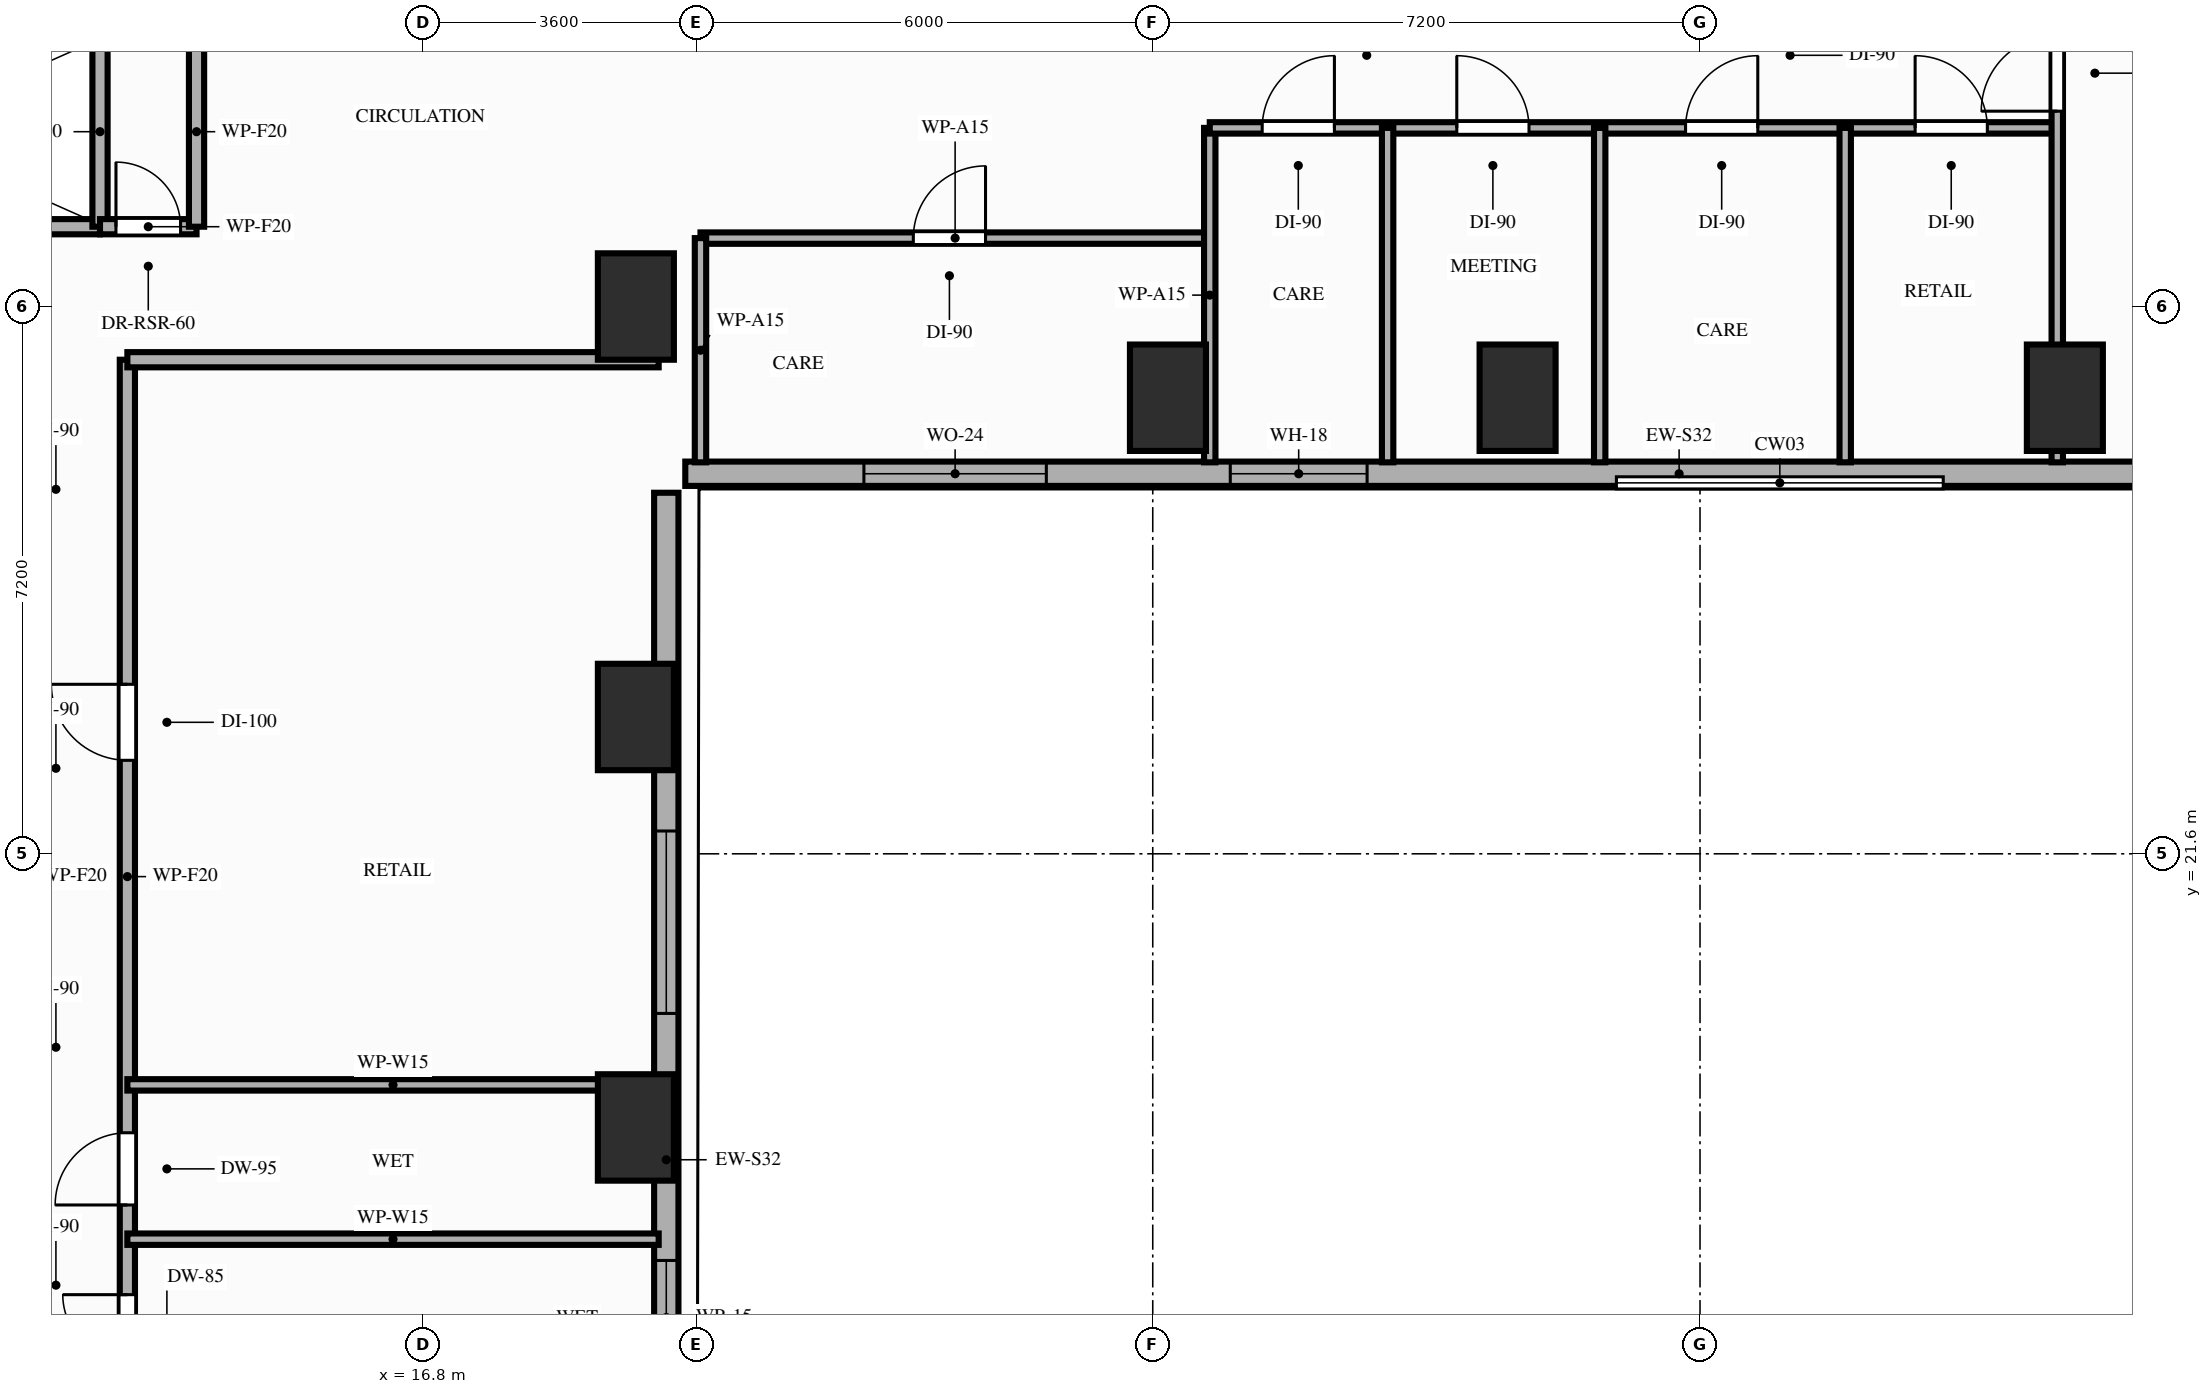
"""IFC4 building model, lengths in metres.
Left out: names, types, materials, properties, quantities, classifications, styles, units other than length and angle.
Written with IfcOpenShell. Run it as: python <this file> out.ifc"""

import sys

from ifc_helpers import new_model, si_unit, direction, frame, frame_2d, origin, origin_2d, place, context, subcontext, project, spatial, rectangle, extrude, element, fill, save


model = new_model("IFC4")
c1 = context("Model", 3, precision=1e-05, world=origin(), true_north=direction((0.0, 1.0)))
c2 = subcontext(c1, "Body", "Model", "MODEL_VIEW")
j1 = project(units=[si_unit("LENGTHUNIT", "METRE"), si_unit("PLANEANGLEUNIT", "RADIAN")], contexts=[c1])
p1 = place(None, origin())
s1 = spatial("IfcSite", under=j1, at=p1, CompositionType="ELEMENT")
p2 = place(p1, origin())
s2 = spatial("IfcBuilding", under=s1, at=p2, CompositionType="ELEMENT")
p3 = place(p2, frame((0.0, 0.0, 53.2)))
s3 = spatial("IfcBuildingStorey", under=s2, at=p3, CompositionType="ELEMENT", Elevation=53.2)
for number, where, z_axis, x_axis in (
    (1, (19.6, 18.0, 0.0), (0.0, 0.0, 1.0), (1.0, 0.0, 0.0)),
    (2, (19.6, 23.4, 0.0), (0.0, 0.0, 1.0), (1.0, 0.0, 0.0)),
    (3, (19.6, 28.8, 0.0), (0.0, 0.0, 1.0), (1.0, 0.0, 0.0)),
    (4, (26.6, 27.6, 0.0), (0.0, 0.0, 1.0), (1.0, 0.0, 0.0)),
    (5, (31.2, 27.6, 0.0), (0.0, 0.0, 1.0), (1.0, 0.0, 0.0)),
    (6, (38.4, 27.6, 0.0), (0.0, 0.0, 1.0), (1.0, 0.0, 0.0)),
):
    element("IfcColumn", number, at=place(p3, frame(where, z_axis=z_axis, x_axis=x_axis)), inside=s3, PredefinedType="COLUMN", context=c2, shape_type="SweptSolid", body=[
        extrude(rectangle(XDim=1.0, YDim=1.4, at=origin_2d()), origin(), (0.0, 0.0, 1.0), 3.2),
    ])
p4 = place(p3, frame((20.0, 8.8, 0.0), z_axis=(0.0, 0.0, 1.0), x_axis=(0.0, 1.0, 0.0)))
e7 = element("IfcWall", 7, at=p4, inside=s3, PredefinedType="STANDARD", context=c2, shape_type="SweptSolid", body=[
    extrude(rectangle(XDim=17.55, YDim=0.32, at=frame_2d((8.775, 0.0))), origin(), (0.0, 0.0, 1.0), 2.41),
])
p5 = place(p4, frame((5.95, 0.0, 0.85)))
e8 = element("IfcOpeningElement", 8, at=p5, cuts=e7, PredefinedType="OPENING", context=c2, shape_type="SweptSolid", body=[
    extrude(rectangle(XDim=1.5, YDim=1.31, at=frame_2d((0.75, 0.655))), frame((0.0, 0.17, 0.0), z_axis=(0.0, -1.0, 0.0), x_axis=(1.0, 0.0, 0.0)), (0.0, 0.0, 1.0), 0.34),
])
p6 = place(p4, frame((10.7, 0.0, 0.85)))
e9 = element("IfcOpeningElement", 9, at=p6, cuts=e7, PredefinedType="OPENING", context=c2, shape_type="SweptSolid", body=[
    extrude(rectangle(XDim=2.4, YDim=1.31, at=frame_2d((1.2, 0.655))), frame((0.0, 0.17, 0.0), z_axis=(0.0, -1.0, 0.0), x_axis=(1.0, 0.0, 0.0)), (0.0, 0.0, 1.0), 0.34),
])
p7 = place(p3, frame((20.25, 26.6, 0.0), z_axis=(0.0, 0.0, 1.0), x_axis=(1.0, 0.0, 0.0)))
e10 = element("IfcWall", 10, at=p7, inside=s3, PredefinedType="STANDARD", context=c2, shape_type="SweptSolid", body=[
    extrude(rectangle(XDim=26.15, YDim=0.32, at=frame_2d((13.075, 0.0))), origin(), (0.0, 0.0, 1.0), 2.71),
])
p8 = place(p7, frame((2.35, 0.0, 0.85)))
e11 = element("IfcOpeningElement", 11, at=p8, cuts=e10, PredefinedType="OPENING", context=c2, shape_type="SweptSolid", body=[
    extrude(rectangle(XDim=2.4, YDim=1.61, at=frame_2d((1.2, 0.805))), frame((0.0, 0.17, 0.0), z_axis=(0.0, -1.0, 0.0), x_axis=(1.0, 0.0, 0.0)), (0.0, 0.0, 1.0), 0.34),
])
p9 = place(p7, frame((7.17, 0.0, 0.85)))
e12 = element("IfcOpeningElement", 12, at=p9, cuts=e10, PredefinedType="OPENING", context=c2, shape_type="SweptSolid", body=[
    extrude(rectangle(XDim=1.8, YDim=1.61, at=frame_2d((0.9, 0.805))), frame((0.0, 0.17, 0.0), z_axis=(0.0, -1.0, 0.0), x_axis=(1.0, 0.0, 0.0)), (0.0, 0.0, 1.0), 0.34),
])
p10 = place(p7, frame((21.95, 0.0, 0.85)))
e13 = element("IfcOpeningElement", 13, at=p10, cuts=e10, PredefinedType="OPENING", context=c2, shape_type="SweptSolid", body=[
    extrude(rectangle(XDim=2.4, YDim=1.61, at=frame_2d((1.2, 0.805))), frame((0.0, 0.17, 0.0), z_axis=(0.0, -1.0, 0.0), x_axis=(1.0, 0.0, 0.0)), (0.0, 0.0, 1.0), 0.34),
])
p11 = place(p3, frame((7.0, 29.85, 0.0), z_axis=(0.0, 0.0, 1.0), x_axis=(1.0, 0.0, 0.0)))
e14 = element("IfcWall", 14, at=p11, inside=s3, PredefinedType="MOVABLE", context=c2, shape_type="SweptSolid", body=[
    extrude(rectangle(XDim=5.55, YDim=0.2, at=frame_2d((2.775, 0.0))), origin(), (0.0, 0.0, 1.0), 3.02),
])
p12 = place(p3, frame((12.55, 29.85, 0.0), z_axis=(0.0, 0.0, 1.0), x_axis=(0.0, 1.0, 0.0)))
e15 = element("IfcWall", 15, at=p12, inside=s3, PredefinedType="MOVABLE", context=c2, shape_type="SweptSolid", body=[
    extrude(rectangle(XDim=2.5, YDim=0.2, at=frame_2d((1.25, 0.0))), origin(), (0.0, 0.0, 1.0), 3.02),
])
p13 = place(p3, frame((12.55, 29.85, 0.0), z_axis=(0.0, 0.0, 1.0), x_axis=(1.0, 0.0, 0.0)))
e16 = element("IfcWall", 16, at=p13, inside=s3, PredefinedType="PARTITIONING", context=c2, shape_type="SweptSolid", body=[
    extrude(rectangle(XDim=1.27, YDim=0.2, at=frame_2d((0.635, 0.0))), origin(), (0.0, 0.0, 1.0), 3.02),
])
p14 = place(p13, frame((0.21, 0.0, 0.0)))
e17 = element("IfcOpeningElement", 17, at=p14, cuts=e16, PredefinedType="OPENING", context=c2, shape_type="SweptSolid", body=[
    extrude(rectangle(XDim=0.85, YDim=2.05, at=frame_2d((0.425, 1.025))), frame((0.0, 0.11, 0.0), z_axis=(0.0, -1.0, 0.0), x_axis=(1.0, 0.0, 0.0)), (0.0, 0.0, 1.0), 0.22),
])
p15 = place(p3, frame((13.82, 29.85, 0.0), z_axis=(0.0, 0.0, 1.0), x_axis=(0.0, 1.0, 0.0)))
e18 = element("IfcWall", 18, at=p15, inside=s3, PredefinedType="PARTITIONING", context=c2, shape_type="SweptSolid", body=[
    extrude(rectangle(XDim=2.5, YDim=0.2, at=frame_2d((1.25, 0.0))), origin(), (0.0, 0.0, 1.0), 3.02),
])
p16 = place(p3, frame((12.91, 14.5, 0.0), z_axis=(0.0, 0.0, 1.0), x_axis=(0.0, 1.0, 0.0)))
e19 = element("IfcWall", 19, at=p16, inside=s3, PredefinedType="PARTITIONING", context=c2, shape_type="SweptSolid", body=[
    extrude(rectangle(XDim=13.6, YDim=0.2, at=frame_2d((6.8, 0.0))), origin(), (0.0, 0.0, 1.0), 2.41),
])
p17 = place(p16, frame((0.45, 0.0, 0.0)))
e20 = element("IfcOpeningElement", 20, at=p17, cuts=e19, PredefinedType="OPENING", context=c2, shape_type="SweptSolid", body=[
    extrude(rectangle(XDim=0.85, YDim=2.1, at=frame_2d((0.425, 1.05))), frame((0.0, 0.11, 0.0), z_axis=(0.0, -1.0, 0.0), x_axis=(1.0, 0.0, 0.0)), (0.0, 0.0, 1.0), 0.22),
])
p18 = place(p16, frame((2.48, 0.0, 0.0)))
e21 = element("IfcOpeningElement", 21, at=p18, cuts=e19, PredefinedType="OPENING", context=c2, shape_type="SweptSolid", body=[
    extrude(rectangle(XDim=0.95, YDim=2.1, at=frame_2d((0.475, 1.05))), frame((0.0, 0.11, 0.0), z_axis=(0.0, -1.0, 0.0), x_axis=(1.0, 0.0, 0.0)), (0.0, 0.0, 1.0), 0.22),
])
p19 = place(p16, frame((8.33, 0.0, 0.0)))
e22 = element("IfcOpeningElement", 22, at=p19, cuts=e19, PredefinedType="OPENING", context=c2, shape_type="SweptSolid", body=[
    extrude(rectangle(XDim=1.0, YDim=2.15, at=frame_2d((0.5, 1.075))), frame((0.0, 0.11, 0.0), z_axis=(0.0, -1.0, 0.0), x_axis=(1.0, 0.0, 0.0)), (0.0, 0.0, 1.0), 0.22),
])
p20 = place(p3, frame((12.91, 28.1, 0.0), z_axis=(0.0, 0.0, 1.0), x_axis=(1.0, 0.0, 0.0)))
e23 = element("IfcWall", 23, at=p20, inside=s3, PredefinedType="PARTITIONING", context=c2, shape_type="SweptSolid", body=[
    extrude(rectangle(XDim=6.99, YDim=0.2, at=frame_2d((3.495, 0.0))), origin(), (0.0, 0.0, 1.0), 2.41),
])
p21 = place(p3, frame((20.45, 29.7, 0.0), z_axis=(0.0, 0.0, 1.0), x_axis=(1.0, 0.0, 0.0)))
e24 = element("IfcWall", 24, at=p21, inside=s3, PredefinedType="PARTITIONING", context=c2, shape_type="SweptSolid", body=[
    extrude(rectangle(XDim=6.7, YDim=0.15, at=frame_2d((3.35, 0.0))), origin(), (0.0, 0.0, 1.0), 3.02),
])
p22 = place(p21, frame((2.8, 0.0, 0.0)))
e25 = element("IfcOpeningElement", 25, at=p22, cuts=e24, PredefinedType="OPENING", context=c2, shape_type="SweptSolid", body=[
    extrude(rectangle(XDim=0.95, YDim=2.15, at=frame_2d((0.475, 1.075))), frame((0.0, 0.085, 0.0), z_axis=(0.0, -1.0, 0.0), x_axis=(1.0, 0.0, 0.0)), (0.0, 0.0, 1.0), 0.17),
])
p23 = place(p3, frame((20.45, 26.75, 0.0), z_axis=(0.0, 0.0, 1.0), x_axis=(0.0, 1.0, 0.0)))
e26 = element("IfcWall", 26, at=p23, inside=s3, PredefinedType="PARTITIONING", context=c2, shape_type="SweptSolid", body=[
    extrude(rectangle(XDim=2.95, YDim=0.15, at=frame_2d((1.475, 0.0))), origin(), (0.0, 0.0, 1.0), 2.41),
])
p24 = place(p3, frame((27.15, 26.75, 0.0), z_axis=(0.0, 0.0, 1.0), x_axis=(0.0, 1.0, 0.0)))
e27 = element("IfcWall", 27, at=p24, inside=s3, PredefinedType="PARTITIONING", context=c2, shape_type="SweptSolid", body=[
    extrude(rectangle(XDim=4.4, YDim=0.15, at=frame_2d((2.2, 0.0))), origin(), (0.0, 0.0, 1.0), 2.41),
])
for number, where, z_axis, x_axis in (
    (28, (12.91, 16.53, 0.0), (0.0, 0.0, 1.0), (1.0, 0.0, 0.0)),
    (29, (12.91, 18.56, 0.0), (0.0, 0.0, 1.0), (1.0, 0.0, 0.0)),
):
    element("IfcWall", number, at=place(p3, frame(where, z_axis=z_axis, x_axis=x_axis)), inside=s3, PredefinedType="PARTITIONING", context=c2, shape_type="SweptSolid", body=[
        extrude(rectangle(XDim=6.99, YDim=0.15, at=frame_2d((3.495, 0.0))), origin(), (0.0, 0.0, 1.0), 2.41),
    ])
p25 = place(p3, frame((27.15, 31.15, 0.0), z_axis=(0.0, 0.0, 1.0), x_axis=(1.0, 0.0, 0.0)))
e30 = element("IfcWall", 30, at=p25, inside=s3, PredefinedType="PARTITIONING", context=c2, shape_type="SweptSolid", body=[
    extrude(rectangle(XDim=11.15, YDim=0.15, at=frame_2d((5.575, 0.0))), origin(), (0.0, 0.0, 1.0), 2.41),
])
p26 = place(p25, frame((0.69, 0.0, 0.0)))
e31 = element("IfcOpeningElement", 31, at=p26, cuts=e30, PredefinedType="OPENING", context=c2, shape_type="SweptSolid", body=[
    extrude(rectangle(XDim=0.95, YDim=2.15, at=frame_2d((0.475, 1.075))), frame((0.0, 0.085, 0.0), z_axis=(0.0, -1.0, 0.0), x_axis=(1.0, 0.0, 0.0)), (0.0, 0.0, 1.0), 0.17),
])
p27 = place(p25, frame((3.25, 0.0, 0.0)))
e32 = element("IfcOpeningElement", 32, at=p27, cuts=e30, PredefinedType="OPENING", context=c2, shape_type="SweptSolid", body=[
    extrude(rectangle(XDim=0.95, YDim=2.15, at=frame_2d((0.475, 1.075))), frame((0.0, 0.085, 0.0), z_axis=(0.0, -1.0, 0.0), x_axis=(1.0, 0.0, 0.0)), (0.0, 0.0, 1.0), 0.17),
])
p28 = place(p25, frame((6.26, 0.0, 0.0)))
e33 = element("IfcOpeningElement", 33, at=p28, cuts=e30, PredefinedType="OPENING", context=c2, shape_type="SweptSolid", body=[
    extrude(rectangle(XDim=0.95, YDim=2.15, at=frame_2d((0.475, 1.075))), frame((0.0, 0.085, 0.0), z_axis=(0.0, -1.0, 0.0), x_axis=(1.0, 0.0, 0.0)), (0.0, 0.0, 1.0), 0.17),
])
p29 = place(p25, frame((9.28, 0.0, 0.0)))
e34 = element("IfcOpeningElement", 34, at=p29, cuts=e30, PredefinedType="OPENING", context=c2, shape_type="SweptSolid", body=[
    extrude(rectangle(XDim=0.95, YDim=2.15, at=frame_2d((0.475, 1.075))), frame((0.0, 0.085, 0.0), z_axis=(0.0, -1.0, 0.0), x_axis=(1.0, 0.0, 0.0)), (0.0, 0.0, 1.0), 0.17),
])
p30 = place(p3, frame((38.3, 26.75, 0.0), z_axis=(0.0, 0.0, 1.0), x_axis=(0.0, 1.0, 0.0)))
e35 = element("IfcWall", 35, at=p30, inside=s3, PredefinedType="PARTITIONING", context=c2, shape_type="SweptSolid", body=[
    extrude(rectangle(XDim=15.45, YDim=0.15, at=frame_2d((7.725, 0.0))), origin(), (0.0, 0.0, 1.0), 2.41),
])
p31 = place(p30, frame((4.62, 0.0, 0.0)))
e36 = element("IfcOpeningElement", 36, at=p31, cuts=e35, PredefinedType="OPENING", context=c2, shape_type="SweptSolid", body=[
    extrude(rectangle(XDim=1.0, YDim=2.15, at=frame_2d((0.5, 1.075))), frame((0.0, 0.085, 0.0), z_axis=(0.0, -1.0, 0.0), x_axis=(1.0, 0.0, 0.0)), (0.0, 0.0, 1.0), 0.17),
])
for number, where, z_axis, x_axis in (
    (37, (29.49, 26.75, 0.0), (0.0, 0.0, 1.0), (0.0, 1.0, 0.0)),
    (38, (32.28, 26.75, 0.0), (0.0, 0.0, 1.0), (0.0, 1.0, 0.0)),
    (39, (35.51, 26.75, 0.0), (0.0, 0.0, 1.0), (0.0, 1.0, 0.0)),
):
    element("IfcWall", number, at=place(p3, frame(where, z_axis=z_axis, x_axis=x_axis)), inside=s3, PredefinedType="PARTITIONING", context=c2, shape_type="SweptSolid", body=[
        extrude(rectangle(XDim=4.4, YDim=0.15, at=frame_2d((2.2, 0.0))), origin(), (0.0, 0.0, 1.0), 2.41),
    ])
p32 = place(p8, origin())
e40 = element("IfcWindow", 40, at=p32, inside=s3, PartitioningType="SINGLE_PANEL", PredefinedType="WINDOW", context=c2, shape_type="SweptSolid", body=[
    extrude(rectangle(XDim=2.4, YDim=1.61, at=frame_2d((1.2, 0.805))), frame((0.0, 0.03, 0.0), z_axis=(0.0, -1.0, 0.0), x_axis=(1.0, 0.0, 0.0)), (0.0, 0.0, 1.0), 0.06),
])
fill(e11, e40)
p33 = place(p9, origin())
e41 = element("IfcWindow", 41, at=p33, inside=s3, PartitioningType="SINGLE_PANEL", PredefinedType="WINDOW", context=c2, shape_type="SweptSolid", body=[
    extrude(rectangle(XDim=1.8, YDim=1.61, at=frame_2d((0.9, 0.805))), frame((0.0, 0.03, 0.0), z_axis=(0.0, -1.0, 0.0), x_axis=(1.0, 0.0, 0.0)), (0.0, 0.0, 1.0), 0.06),
])
fill(e12, e41)
p34 = place(p5, origin())
e42 = element("IfcWindow", 42, at=p34, inside=s3, PartitioningType="SINGLE_PANEL", PredefinedType="WINDOW", context=c2, shape_type="SweptSolid", body=[
    extrude(rectangle(XDim=1.5, YDim=1.31, at=frame_2d((0.75, 0.655))), frame((0.0, 0.03, 0.0), z_axis=(0.0, -1.0, 0.0), x_axis=(1.0, 0.0, 0.0)), (0.0, 0.0, 1.0), 0.06),
])
fill(e8, e42)
p35 = place(p6, origin())
e43 = element("IfcWindow", 43, at=p35, inside=s3, PartitioningType="SINGLE_PANEL", PredefinedType="WINDOW", context=c2, shape_type="SweptSolid", body=[
    extrude(rectangle(XDim=2.4, YDim=1.31, at=frame_2d((1.2, 0.655))), frame((0.0, 0.03, 0.0), z_axis=(0.0, -1.0, 0.0), x_axis=(1.0, 0.0, 0.0)), (0.0, 0.0, 1.0), 0.06),
])
fill(e9, e43)
p36 = place(p14, origin())
e44 = element("IfcDoor", 44, at=p36, inside=s3, OperationType="SINGLE_SWING_LEFT", PredefinedType="DOOR", context=c2, shape_type="SweptSolid", body=[
    extrude(rectangle(XDim=0.85, YDim=2.05, at=frame_2d((0.425, 1.025))), frame((0.0, 0.025, 0.0), z_axis=(0.0, -1.0, 0.0), x_axis=(1.0, 0.0, 0.0)), (0.0, 0.0, 1.0), 0.05),
])
fill(e17, e44)
p37 = place(p22, origin())
e45 = element("IfcDoor", 45, at=p37, inside=s3, OperationType="SINGLE_SWING_RIGHT", PredefinedType="DOOR", context=c2, shape_type="SweptSolid", body=[
    extrude(rectangle(XDim=0.95, YDim=2.15, at=frame_2d((0.475, 1.075))), frame((0.0, 0.025, 0.0), z_axis=(0.0, -1.0, 0.0), x_axis=(1.0, 0.0, 0.0)), (0.0, 0.0, 1.0), 0.05),
])
fill(e25, e45)
p38 = place(p17, origin())
e46 = element("IfcDoor", 46, at=p38, inside=s3, OperationType="SINGLE_SWING_RIGHT", PredefinedType="DOOR", context=c2, shape_type="SweptSolid", body=[
    extrude(rectangle(XDim=0.85, YDim=2.1, at=frame_2d((0.425, 1.05))), frame((0.0, 0.025, 0.0), z_axis=(0.0, -1.0, 0.0), x_axis=(1.0, 0.0, 0.0)), (0.0, 0.0, 1.0), 0.05),
])
fill(e20, e46)
p39 = place(p18, origin())
e47 = element("IfcDoor", 47, at=p39, inside=s3, OperationType="SINGLE_SWING_LEFT", PredefinedType="DOOR", context=c2, shape_type="SweptSolid", body=[
    extrude(rectangle(XDim=0.95, YDim=2.1, at=frame_2d((0.475, 1.05))), frame((0.0, 0.025, 0.0), z_axis=(0.0, -1.0, 0.0), x_axis=(1.0, 0.0, 0.0)), (0.0, 0.0, 1.0), 0.05),
])
fill(e21, e47)
p40 = place(p19, origin())
e48 = element("IfcDoor", 48, at=p40, inside=s3, OperationType="SINGLE_SWING_RIGHT", PredefinedType="DOOR", context=c2, shape_type="SweptSolid", body=[
    extrude(rectangle(XDim=1.0, YDim=2.15, at=frame_2d((0.5, 1.075))), frame((0.0, 0.025, 0.0), z_axis=(0.0, -1.0, 0.0), x_axis=(1.0, 0.0, 0.0)), (0.0, 0.0, 1.0), 0.05),
])
fill(e22, e48)
p41 = place(p31, origin())
e49 = element("IfcDoor", 49, at=p41, inside=s3, OperationType="SINGLE_SWING_LEFT", PredefinedType="DOOR", context=c2, shape_type="SweptSolid", body=[
    extrude(rectangle(XDim=1.0, YDim=2.15, at=frame_2d((0.5, 1.075))), frame((0.0, 0.025, 0.0), z_axis=(0.0, -1.0, 0.0), x_axis=(1.0, 0.0, 0.0)), (0.0, 0.0, 1.0), 0.05),
])
fill(e36, e49)
p42 = place(p26, origin())
e50 = element("IfcDoor", 50, at=p42, inside=s3, OperationType="SINGLE_SWING_RIGHT", PredefinedType="DOOR", context=c2, shape_type="SweptSolid", body=[
    extrude(rectangle(XDim=0.95, YDim=2.15, at=frame_2d((0.475, 1.075))), frame((0.0, 0.025, 0.0), z_axis=(0.0, -1.0, 0.0), x_axis=(1.0, 0.0, 0.0)), (0.0, 0.0, 1.0), 0.05),
])
fill(e31, e50)
p43 = place(p27, origin())
e51 = element("IfcDoor", 51, at=p43, inside=s3, OperationType="SINGLE_SWING_LEFT", PredefinedType="DOOR", context=c2, shape_type="SweptSolid", body=[
    extrude(rectangle(XDim=0.95, YDim=2.15, at=frame_2d((0.475, 1.075))), frame((0.0, 0.025, 0.0), z_axis=(0.0, -1.0, 0.0), x_axis=(1.0, 0.0, 0.0)), (0.0, 0.0, 1.0), 0.05),
])
fill(e32, e51)
p44 = place(p28, origin())
e52 = element("IfcDoor", 52, at=p44, inside=s3, OperationType="SINGLE_SWING_RIGHT", PredefinedType="DOOR", context=c2, shape_type="SweptSolid", body=[
    extrude(rectangle(XDim=0.95, YDim=2.15, at=frame_2d((0.475, 1.075))), frame((0.0, 0.025, 0.0), z_axis=(0.0, -1.0, 0.0), x_axis=(1.0, 0.0, 0.0)), (0.0, 0.0, 1.0), 0.05),
])
fill(e33, e52)
p45 = place(p29, origin())
e53 = element("IfcDoor", 53, at=p45, inside=s3, OperationType="SINGLE_SWING_LEFT", PredefinedType="DOOR", context=c2, shape_type="SweptSolid", body=[
    extrude(rectangle(XDim=0.95, YDim=2.15, at=frame_2d((0.475, 1.075))), frame((0.0, 0.025, 0.0), z_axis=(0.0, -1.0, 0.0), x_axis=(1.0, 0.0, 0.0)), (0.0, 0.0, 1.0), 0.05),
])
fill(e34, e53)
save(model, sys.argv[1])
